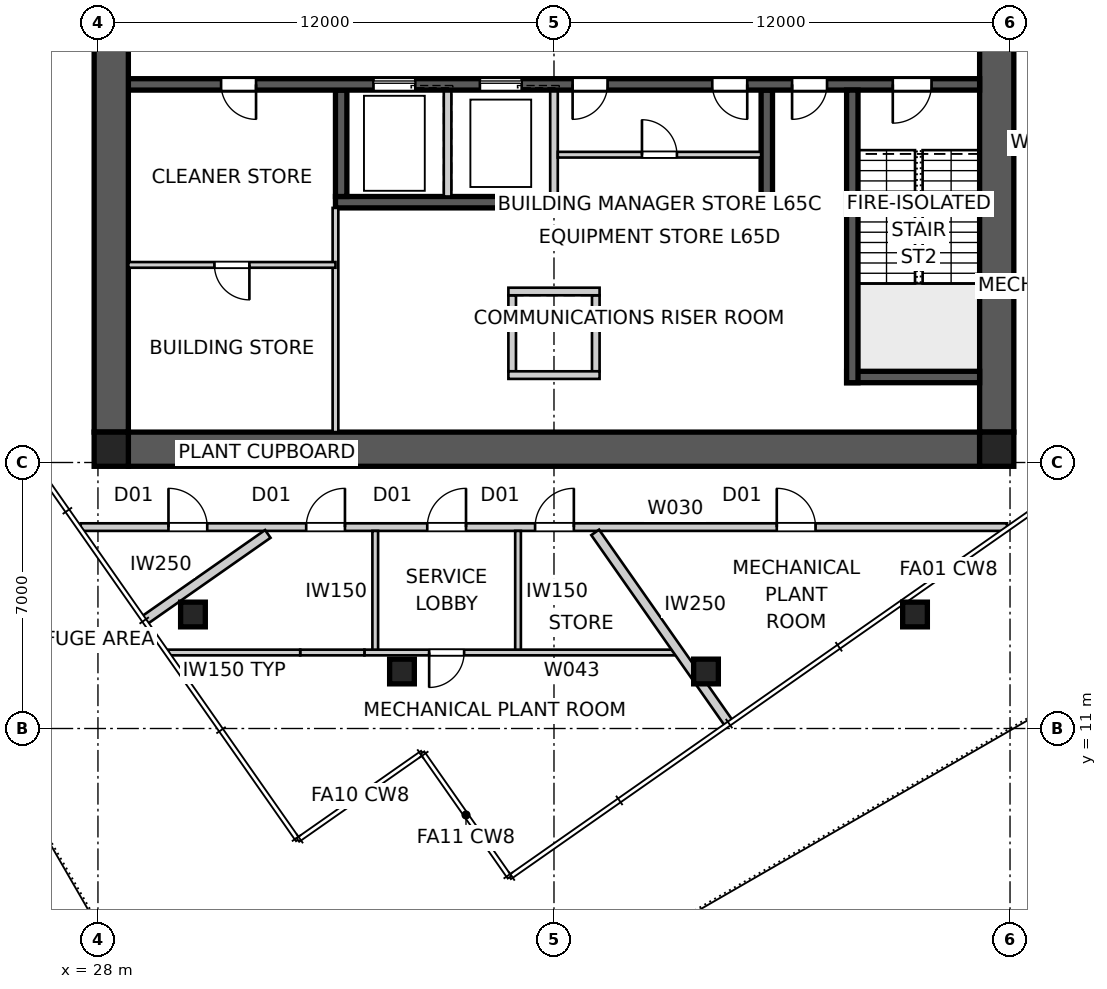
"""IFC4 building model, lengths in metres.
Left out: names, types, materials, properties, quantities, classifications, styles, units other than length and angle.
Written with IfcOpenShell. Run it as: python <this file> out.ifc"""

import sys

from ifc_helpers import new_model, si_unit, direction, frame, frame_2d, origin, origin_2d, place, context, subcontext, project, spatial, polyline, rectangle, outline, extrude, element, fill, save


model = new_model("IFC4")
c1 = context("Model", 3, precision=1e-05, world=origin(), true_north=direction((0.0, 1.0)))
c2 = subcontext(c1, "Body", "Model", "MODEL_VIEW")
j1 = project(units=[si_unit("LENGTHUNIT", "METRE"), si_unit("PLANEANGLEUNIT", "RADIAN")], contexts=[c1])
p1 = place(None, origin())
s1 = spatial("IfcSite", under=j1, at=p1, CompositionType="ELEMENT")
p2 = place(p1, origin())
s2 = spatial("IfcBuilding", under=s1, at=p2, CompositionType="ELEMENT")
p3 = place(p2, frame((0.0, 0.0, 235.4)))
s3 = spatial("IfcBuildingStorey", under=s2, at=p3, CompositionType="ELEMENT", Elevation=235.4)
p4 = place(p3, frame((51.2, 18.35, 0.0), z_axis=(0.0, 0.0, 1.0), x_axis=(-1.0, 0.0, 0.0)))
e1 = element("IfcWall", 1, at=p4, inside=s3, PredefinedType="SHEAR", context=c2, shape_type="SweptSolid", body=[
    extrude(outline(polyline([(0.0, -0.45), (22.4, -0.45), (22.4, -0.025), (22.85, -0.025), (22.85, 0.025), (22.4, 0.025), (22.4, 0.45), (0.0, 0.45), (0.0, 0.025), (-0.45, 0.025), (-0.45, -0.025), (0.0, -0.025), (0.0, -0.45)])), origin(), (0.0, 0.0, 1.0), 5.0),
])
p5 = place(p3, frame((51.65, 18.8, 0.0), z_axis=(0.0, 0.0, 1.0), x_axis=(0.0, 1.0, 0.0)))
e2 = element("IfcWall", 2, at=p5, inside=s3, PredefinedType="SHEAR", context=c2, shape_type="SweptSolid", body=[
    extrude(outline(polyline([(0.0, -0.45), (22.4, -0.45), (22.4, -0.025), (22.85, -0.025), (22.85, 0.025), (22.4, 0.025), (22.4, 0.45), (0.0, 0.45), (0.0, 0.025), (-0.45, 0.025), (-0.45, -0.025), (0.0, -0.025), (0.0, -0.45)])), origin(), (0.0, 0.0, 1.0), 5.0),
])
p6 = place(p5, frame((11.14, 0.0, 0.0)))
e3 = element("IfcOpeningElement", 3, at=p6, cuts=e2, PredefinedType="OPENING", context=c2, shape_type="SweptSolid", body=[
    extrude(rectangle(XDim=1.02, YDim=2.4, at=frame_2d((0.51, 1.2))), frame((0.0, 0.46, 0.0), z_axis=(0.0, -1.0, 0.0), x_axis=(1.0, 0.0, 0.0)), (0.0, 0.0, 1.0), 0.92),
])
p7 = place(p3, frame((28.35, 41.2, 0.0), z_axis=(0.0, 0.0, 1.0), x_axis=(0.0, -1.0, 0.0)))
e4 = element("IfcWall", 4, at=p7, inside=s3, PredefinedType="SHEAR", context=c2, shape_type="SweptSolid", body=[
    extrude(outline(polyline([(0.0, -0.45), (22.4, -0.45), (22.4, -0.025), (22.85, -0.025), (22.85, 0.025), (22.4, 0.025), (22.4, 0.45), (0.0, 0.45), (0.0, 0.025), (-0.45, 0.025), (-0.45, -0.025), (0.0, -0.025), (0.0, -0.45)])), origin(), (0.0, 0.0, 1.0), 5.0),
])
p8 = place(p7, frame((11.14, 0.0, 0.0)))
e5 = element("IfcOpeningElement", 5, at=p8, cuts=e4, PredefinedType="OPENING", context=c2, shape_type="SweptSolid", body=[
    extrude(rectangle(XDim=1.02, YDim=2.4, at=frame_2d((0.51, 1.2))), frame((0.0, 0.46, 0.0), z_axis=(0.0, -1.0, 0.0), x_axis=(1.0, 0.0, 0.0)), (0.0, 0.0, 1.0), 0.92),
])
p9 = place(p3, frame((51.2, 27.95, 0.0), z_axis=(0.0, 0.0, 1.0), x_axis=(-1.0, 0.0, 0.0)))
e6 = element("IfcWall", 6, at=p9, inside=s3, PredefinedType="SHEAR", context=c2, shape_type="SweptSolid", body=[
    extrude(rectangle(XDim=22.4, YDim=0.3, at=frame_2d((11.2, 0.0))), origin(), (0.0, 0.0, 1.0), 5.0),
])
p10 = place(p9, frame((19.04, 0.0, 0.0)))
e7 = element("IfcOpeningElement", 7, at=p10, cuts=e6, PredefinedType="OPENING", context=c2, shape_type="SweptSolid", body=[
    extrude(rectangle(XDim=0.92, YDim=2.1, at=frame_2d((0.46, 1.05))), frame((0.0, 0.16, 0.0), z_axis=(0.0, -1.0, 0.0), x_axis=(1.0, 0.0, 0.0)), (0.0, 0.0, 1.0), 0.32),
])
p11 = place(p9, frame((1.265, 0.0, 0.0)))
e8 = element("IfcOpeningElement", 8, at=p11, cuts=e6, PredefinedType="OPENING", context=c2, shape_type="SweptSolid", body=[
    extrude(rectangle(XDim=1.02, YDim=2.1, at=frame_2d((0.51, 1.05))), frame((0.0, 0.16, 0.0), z_axis=(0.0, -1.0, 0.0), x_axis=(1.0, 0.0, 0.0)), (0.0, 0.0, 1.0), 0.32),
])
p12 = place(p9, frame((4.015, 0.0, 0.0)))
e9 = element("IfcOpeningElement", 9, at=p12, cuts=e6, PredefinedType="OPENING", context=c2, shape_type="SweptSolid", body=[
    extrude(rectangle(XDim=0.92, YDim=2.1, at=frame_2d((0.46, 1.05))), frame((0.0, 0.16, 0.0), z_axis=(0.0, -1.0, 0.0), x_axis=(1.0, 0.0, 0.0)), (0.0, 0.0, 1.0), 0.32),
])
p13 = place(p9, frame((9.79, 0.0, 0.0)))
e10 = element("IfcOpeningElement", 10, at=p13, cuts=e6, PredefinedType="OPENING", context=c2, shape_type="SweptSolid", body=[
    extrude(rectangle(XDim=0.92, YDim=2.1, at=frame_2d((0.46, 1.05))), frame((0.0, 0.16, 0.0), z_axis=(0.0, -1.0, 0.0), x_axis=(1.0, 0.0, 0.0)), (0.0, 0.0, 1.0), 0.32),
])
p14 = place(p9, frame((6.115, 0.0, 0.0)))
e11 = element("IfcOpeningElement", 11, at=p14, cuts=e6, PredefinedType="OPENING", context=c2, shape_type="SweptSolid", body=[
    extrude(rectangle(XDim=0.92, YDim=2.1, at=frame_2d((0.46, 1.05))), frame((0.0, 0.16, 0.0), z_axis=(0.0, -1.0, 0.0), x_axis=(1.0, 0.0, 0.0)), (0.0, 0.0, 1.0), 0.32),
])
p15 = place(p9, frame((12.05, 0.0, 0.0)))
e12 = element("IfcOpeningElement", 12, at=p15, cuts=e6, PredefinedType="OPENING", context=c2, shape_type="SweptSolid", body=[
    extrude(rectangle(XDim=1.1, YDim=2.1, at=frame_2d((0.55, 1.05))), frame((0.0, 0.16, 0.0), z_axis=(0.0, -1.0, 0.0), x_axis=(1.0, 0.0, 0.0)), (0.0, 0.0, 1.0), 0.32),
])
p16 = place(p9, frame((14.85, 0.0, 0.0)))
e13 = element("IfcOpeningElement", 13, at=p16, cuts=e6, PredefinedType="OPENING", context=c2, shape_type="SweptSolid", body=[
    extrude(rectangle(XDim=1.1, YDim=2.1, at=frame_2d((0.55, 1.05))), frame((0.0, 0.16, 0.0), z_axis=(0.0, -1.0, 0.0), x_axis=(1.0, 0.0, 0.0)), (0.0, 0.0, 1.0), 0.32),
])
p17 = place(p3, frame((45.75, 24.85, 0.0), z_axis=(0.0, 0.0, 1.0), x_axis=(-1.0, 0.0, 0.0)))
e14 = element("IfcWall", 14, at=p17, inside=s3, PredefinedType="SHEAR", context=c2, shape_type="SweptSolid", body=[
    extrude(rectangle(XDim=11.5, YDim=0.3, at=frame_2d((5.75, 0.0))), origin(), (0.0, 0.0, 1.0), 5.0),
])
p18 = place(p3, frame((45.6, 27.8, 0.0), z_axis=(0.0, 0.0, 1.0), x_axis=(0.0, -1.0, 0.0)))
e15 = element("IfcWall", 15, at=p18, inside=s3, PredefinedType="SHEAR", context=c2, shape_type="SweptSolid", body=[
    extrude(rectangle(XDim=2.8, YDim=0.3, at=frame_2d((1.4, 0.0))), origin(), (0.0, 0.0, 1.0), 5.0),
])
for number, where, z_axis, x_axis in (
    (16, (40.0, 27.8, 0.0), (0.0, 0.0, 1.0), (0.0, -1.0, 0.0)),
    (17, (37.2, 27.8, 0.0), (0.0, 0.0, 1.0), (0.0, -1.0, 0.0)),
):
    element("IfcWall", number, at=place(p3, frame(where, z_axis=z_axis, x_axis=x_axis)), inside=s3, PredefinedType="SOLIDWALL", context=c2, shape_type="SweptSolid", body=[
        extrude(rectangle(XDim=2.8, YDim=0.2, at=frame_2d((1.4, 0.0))), origin(), (0.0, 0.0, 1.0), 5.0),
    ])
p19 = place(p3, frame((34.4, 27.8, 0.0), z_axis=(0.0, 0.0, 1.0), x_axis=(0.0, -1.0, 0.0)))
e18 = element("IfcWall", 18, at=p19, inside=s3, PredefinedType="SHEAR", context=c2, shape_type="SweptSolid", body=[
    extrude(rectangle(XDim=2.8, YDim=0.3, at=frame_2d((1.4, 0.0))), origin(), (0.0, 0.0, 1.0), 5.0),
])
p20 = place(p3, frame((47.85, 27.8, 0.0), z_axis=(0.0, 0.0, 1.0), x_axis=(0.0, -1.0, 0.0)))
e19 = element("IfcWall", 19, at=p20, inside=s3, PredefinedType="SHEAR", context=c2, shape_type="SweptSolid", body=[
    extrude(rectangle(XDim=7.7, YDim=0.3, at=frame_2d((3.85, 0.0))), origin(), (0.0, 0.0, 1.0), 5.0),
])
p21 = place(p3, frame((51.2, 20.25, 0.0), z_axis=(0.0, 0.0, 1.0), x_axis=(-1.0, 0.0, 0.0)))
e20 = element("IfcWall", 20, at=p21, inside=s3, PredefinedType="SHEAR", context=c2, shape_type="SweptSolid", body=[
    extrude(rectangle(XDim=3.5, YDim=0.3, at=frame_2d((1.75, 0.0))), origin(), (0.0, 0.0, 1.0), 5.0),
])
for number, where, z_axis, x_axis in (
    (21, (38.9, 22.4, 0.0), (0.0, 0.0, 1.0), (0.0, -1.0, 0.0)),
    (22, (41.1, 22.4, 0.0), (0.0, 0.0, 1.0), (0.0, -1.0, 0.0)),
):
    element("IfcWall", number, at=place(p3, frame(where, z_axis=z_axis, x_axis=x_axis)), inside=s3, PredefinedType="SOLIDWALL", context=c2, shape_type="SweptSolid", body=[
        extrude(rectangle(XDim=2.0, YDim=0.2, at=frame_2d((1.0, 0.0))), origin(), (0.0, 0.0, 1.0), 5.0),
    ])
for number, where, z_axis, x_axis in (
    (23, (38.8, 22.5, 0.0), (0.0, 0.0, 1.0), (1.0, 0.0, 0.0)),
    (24, (38.8, 20.3, 0.0), (0.0, 0.0, 1.0), (1.0, 0.0, 0.0)),
):
    element("IfcWall", number, at=place(p3, frame(where, z_axis=z_axis, x_axis=x_axis)), inside=s3, PredefinedType="SOLIDWALL", context=c2, shape_type="SweptSolid", body=[
        extrude(rectangle(XDim=2.4, YDim=0.2, at=frame_2d((1.2, 0.0))), origin(), (0.0, 0.0, 1.0), 5.0),
    ])
for number, where, z_axis, x_axis in (
    (25, (28.35, 18.35, 0.0), (0.0, 0.0, 1.0), (1.0, 0.0, 0.0)),
    (26, (51.65, 18.35, 0.0), (0.0, 0.0, 1.0), (1.0, 0.0, 0.0)),
):
    element("IfcColumn", number, at=place(p3, frame(where, z_axis=z_axis, x_axis=x_axis)), inside=s3, PredefinedType="COLUMN", context=c2, shape_type="SweptSolid", body=[
        extrude(rectangle(XDim=0.9, YDim=0.9, at=origin_2d()), origin(), (0.0, 0.0, 1.0), 5.0),
    ])
for number, where, z_axis, x_axis in (
    (27, (30.5, 14.0, 0.0), (0.0, 0.0, 1.0), (1.0, 0.0, 0.0)),
    (28, (36.0, 12.5, 0.0), (0.0, 0.0, 1.0), (1.0, 0.0, 0.0)),
    (29, (44.0, 12.5, 0.0), (0.0, 0.0, 1.0), (1.0, 0.0, 0.0)),
    (30, (49.5, 14.0, 0.0), (0.0, 0.0, 1.0), (1.0, 0.0, 0.0)),
):
    element("IfcColumn", number, at=place(p3, frame(where, z_axis=z_axis, x_axis=x_axis)), inside=s3, PredefinedType="COLUMN", context=c2, shape_type="SweptSolid", body=[
        extrude(rectangle(XDim=0.65, YDim=0.65, at=origin_2d()), origin(), (0.0, 0.0, 1.0), 5.0),
    ])
p22 = place(p3, frame((27.546, 16.3, 0.0), z_axis=(0.0, 0.0, 1.0), x_axis=(1.0, 0.0, 0.0)))
e31 = element("IfcWall", 31, at=p22, inside=s3, PredefinedType="PARTITIONING", context=c2, shape_type="SweptSolid", body=[
    extrude(rectangle(XDim=24.375, YDim=0.2, at=frame_2d((12.188, 0.0))), origin(), (0.0, 0.0, 1.0), 4.85),
])
p23 = place(p22, frame((18.317, 0.0, 0.0)))
e32 = element("IfcOpeningElement", 32, at=p23, cuts=e31, PredefinedType="OPENING", context=c2, shape_type="SweptSolid", body=[
    extrude(rectangle(XDim=1.02, YDim=2.34, at=frame_2d((0.51, 1.17))), frame((0.0, 0.11, 0.0), z_axis=(0.0, -1.0, 0.0), x_axis=(1.0, 0.0, 0.0)), (0.0, 0.0, 1.0), 0.22),
])
p24 = place(p22, frame((2.31, 0.0, 0.0)))
e33 = element("IfcOpeningElement", 33, at=p24, cuts=e31, PredefinedType="OPENING", context=c2, shape_type="SweptSolid", body=[
    extrude(rectangle(XDim=1.02, YDim=2.34, at=frame_2d((0.51, 1.17))), frame((0.0, 0.11, 0.0), z_axis=(0.0, -1.0, 0.0), x_axis=(1.0, 0.0, 0.0)), (0.0, 0.0, 1.0), 0.22),
])
p25 = place(p22, frame((9.119, 0.0, 0.0)))
e34 = element("IfcOpeningElement", 34, at=p25, cuts=e31, PredefinedType="OPENING", context=c2, shape_type="SweptSolid", body=[
    extrude(rectangle(XDim=1.02, YDim=2.34, at=frame_2d((0.51, 1.17))), frame((0.0, 0.11, 0.0), z_axis=(0.0, -1.0, 0.0), x_axis=(1.0, 0.0, 0.0)), (0.0, 0.0, 1.0), 0.22),
])
p26 = place(p22, frame((5.934, 0.0, 0.0)))
e35 = element("IfcOpeningElement", 35, at=p26, cuts=e31, PredefinedType="OPENING", context=c2, shape_type="SweptSolid", body=[
    extrude(rectangle(XDim=1.02, YDim=2.34, at=frame_2d((0.51, 1.17))), frame((0.0, 0.11, 0.0), z_axis=(0.0, -1.0, 0.0), x_axis=(1.0, 0.0, 0.0)), (0.0, 0.0, 1.0), 0.22),
])
p27 = place(p22, frame((11.957, 0.0, 0.0)))
e36 = element("IfcOpeningElement", 36, at=p27, cuts=e31, PredefinedType="OPENING", context=c2, shape_type="SweptSolid", body=[
    extrude(rectangle(XDim=1.02, YDim=2.34, at=frame_2d((0.51, 1.17))), frame((0.0, 0.11, 0.0), z_axis=(0.0, -1.0, 0.0), x_axis=(1.0, 0.0, 0.0)), (0.0, 0.0, 1.0), 0.22),
])
p28 = place(p3, frame((44.607, 11.13, 0.0), z_axis=(0.0, 0.0, 1.0), x_axis=(-0.573561042841, 0.819162822725, 0.0)))
e37 = element("IfcWall", 37, at=p28, inside=s3, PredefinedType="PARTITIONING", context=c2, shape_type="SweptSolid", body=[
    extrude(rectangle(XDim=6.142, YDim=0.25, at=frame_2d((3.071, 0.0))), origin(), (0.0, 0.0, 1.0), 4.85),
])
p29 = place(p3, frame((29.217, 13.843, 0.0), z_axis=(0.0, 0.0, 1.0), x_axis=(0.819156806092, 0.573569635732, 0.0)))
e38 = element("IfcWall", 38, at=p29, inside=s3, PredefinedType="PARTITIONING", context=c2, shape_type="SweptSolid", body=[
    extrude(rectangle(XDim=3.97, YDim=0.25, at=frame_2d((1.985, 0.0))), origin(), (0.0, 0.0, 1.0), 4.85),
])
p30 = place(p3, frame((34.25, 18.8, 0.0), z_axis=(0.0, 0.0, 1.0), x_axis=(0.0, 1.0, 0.0)))
e39 = element("IfcWall", 39, at=p30, inside=s3, PredefinedType="SOLIDWALL", context=c2, shape_type="SweptSolid", body=[
    extrude(rectangle(XDim=5.9, YDim=0.15, at=frame_2d((2.95, 0.0))), origin(), (0.0, 0.0, 1.0), 4.85),
])
p31 = place(p3, frame((34.25, 23.2, 0.0), z_axis=(0.0, 0.0, 1.0), x_axis=(-1.0, 0.0, 0.0)))
e40 = element("IfcWall", 40, at=p31, inside=s3, PredefinedType="SOLIDWALL", context=c2, shape_type="SweptSolid", body=[
    extrude(rectangle(XDim=5.45, YDim=0.15, at=frame_2d((2.725, 0.0))), origin(), (0.0, 0.0, 1.0), 4.85),
])
p32 = place(p31, frame((2.265, 0.0, 0.0)))
e41 = element("IfcOpeningElement", 41, at=p32, cuts=e40, PredefinedType="OPENING", context=c2, shape_type="SweptSolid", body=[
    extrude(rectangle(XDim=0.92, YDim=2.1, at=frame_2d((0.46, 1.05))), frame((0.0, 0.085, 0.0), z_axis=(0.0, -1.0, 0.0), x_axis=(1.0, 0.0, 0.0)), (0.0, 0.0, 1.0), 0.17),
])
for number, where, z_axis, x_axis in (
    (42, (35.296, 13.0, 0.0), (0.0, 0.0, 1.0), (0.0, 1.0, 0.0)),
    (43, (39.054, 16.2, 0.0), (0.0, 0.0, 1.0), (0.0, -1.0, 0.0)),
):
    element("IfcWall", number, at=place(p3, frame(where, z_axis=z_axis, x_axis=x_axis)), inside=s3, PredefinedType="SOLIDWALL", context=c2, shape_type="SweptSolid", body=[
        extrude(rectangle(XDim=3.2, YDim=0.15, at=frame_2d((1.6, 0.0))), origin(), (0.0, 0.0, 1.0), 4.85),
    ])
p33 = place(p3, frame((43.297, 13.0, 0.0), z_axis=(0.0, 0.0, 1.0), x_axis=(-1.0, 0.0, 0.0)))
e44 = element("IfcWall", 44, at=p33, inside=s3, PredefinedType="SOLIDWALL", context=c2, shape_type="SweptSolid", body=[
    extrude(rectangle(XDim=8.285, YDim=0.15, at=frame_2d((4.143, 0.0))), origin(), (0.0, 0.0, 1.0), 4.85),
])
p34 = place(p33, frame((5.662, 0.0, 0.0)))
e45 = element("IfcOpeningElement", 45, at=p34, cuts=e44, PredefinedType="OPENING", context=c2, shape_type="SweptSolid", body=[
    extrude(rectangle(XDim=0.92, YDim=2.1, at=frame_2d((0.46, 1.05))), frame((0.0, 0.085, 0.0), z_axis=(0.0, -1.0, 0.0), x_axis=(1.0, 0.0, 0.0)), (0.0, 0.0, 1.0), 0.17),
])
p35 = place(p3, frame((35.012, 13.0, 0.0), z_axis=(0.0, 0.0, 1.0), x_axis=(-1.0, 0.0, 0.0)))
e46 = element("IfcWall", 46, at=p35, inside=s3, PredefinedType="SOLIDWALL", context=c2, shape_type="SweptSolid", body=[
    extrude(rectangle(XDim=1.69, YDim=0.15, at=frame_2d((0.845, 0.0))), origin(), (0.0, 0.0, 1.0), 3.85),
])
p36 = place(p3, frame((33.322, 13.0, 0.0), z_axis=(0.0, 0.0, 1.0), x_axis=(-1.0, 0.0, 0.0)))
e47 = element("IfcWall", 47, at=p36, inside=s3, PredefinedType="SOLIDWALL", context=c2, shape_type="SweptSolid", body=[
    extrude(rectangle(XDim=3.465, YDim=0.15, at=frame_2d((1.732, 0.0))), origin(), (0.0, 0.0, 1.0), 4.85),
])
p37 = place(p3, frame((40.1, 26.1, 0.0), z_axis=(0.0, 0.0, 1.0), x_axis=(1.0, 0.0, 0.0)))
e48 = element("IfcWall", 48, at=p37, inside=s3, PredefinedType="SOLIDWALL", context=c2, shape_type="SweptSolid", body=[
    extrude(rectangle(XDim=5.35, YDim=0.15, at=frame_2d((2.675, 0.0))), origin(), (0.0, 0.0, 1.0), 4.85),
])
p38 = place(p37, frame((2.215, 0.0, 0.0)))
e49 = element("IfcOpeningElement", 49, at=p38, cuts=e48, PredefinedType="OPENING", context=c2, shape_type="SweptSolid", body=[
    extrude(rectangle(XDim=0.92, YDim=2.1, at=frame_2d((0.46, 1.05))), frame((0.0, 0.085, 0.0), z_axis=(0.0, -1.0, 0.0), x_axis=(1.0, 0.0, 0.0)), (0.0, 0.0, 1.0), 0.17),
])
p39 = place(p10, origin())
e50 = element("IfcDoor", 50, at=p39, inside=s3, OperationType="SINGLE_SWING_LEFT", PredefinedType="DOOR", context=c2, shape_type="SweptSolid", body=[
    extrude(rectangle(XDim=0.92, YDim=2.1, at=frame_2d((0.46, 1.05))), frame((0.0, 0.025, 0.0), z_axis=(0.0, -1.0, 0.0), x_axis=(1.0, 0.0, 0.0)), (0.0, 0.0, 1.0), 0.05),
])
fill(e7, e50)
p40 = place(p11, origin())
e51 = element("IfcDoor", 51, at=p40, inside=s3, OperationType="SINGLE_SWING_RIGHT", PredefinedType="DOOR", context=c2, shape_type="SweptSolid", body=[
    extrude(rectangle(XDim=1.02, YDim=2.1, at=frame_2d((0.51, 1.05))), frame((0.0, 0.025, 0.0), z_axis=(0.0, -1.0, 0.0), x_axis=(1.0, 0.0, 0.0)), (0.0, 0.0, 1.0), 0.05),
])
fill(e8, e51)
p41 = place(p12, origin())
e52 = element("IfcDoor", 52, at=p41, inside=s3, OperationType="SINGLE_SWING_RIGHT", PredefinedType="DOOR", context=c2, shape_type="SweptSolid", body=[
    extrude(rectangle(XDim=0.92, YDim=2.1, at=frame_2d((0.46, 1.05))), frame((0.0, 0.025, 0.0), z_axis=(0.0, -1.0, 0.0), x_axis=(1.0, 0.0, 0.0)), (0.0, 0.0, 1.0), 0.05),
])
fill(e9, e52)
p42 = place(p23, origin())
e53 = element("IfcDoor", 53, at=p42, inside=s3, OperationType="SINGLE_SWING_LEFT", PredefinedType="DOOR", context=c2, shape_type="SweptSolid", body=[
    extrude(rectangle(XDim=1.02, YDim=2.34, at=frame_2d((0.51, 1.17))), frame((0.0, 0.025, 0.0), z_axis=(0.0, -1.0, 0.0), x_axis=(1.0, 0.0, 0.0)), (0.0, 0.0, 1.0), 0.05),
])
fill(e32, e53)
p43 = place(p24, origin())
e54 = element("IfcDoor", 54, at=p43, inside=s3, OperationType="SINGLE_SWING_LEFT", PredefinedType="DOOR", context=c2, shape_type="SweptSolid", body=[
    extrude(rectangle(XDim=1.02, YDim=2.34, at=frame_2d((0.51, 1.17))), frame((0.0, 0.025, 0.0), z_axis=(0.0, -1.0, 0.0), x_axis=(1.0, 0.0, 0.0)), (0.0, 0.0, 1.0), 0.05),
])
fill(e33, e54)
p44 = place(p25, origin())
e55 = element("IfcDoor", 55, at=p44, inside=s3, OperationType="SINGLE_SWING_RIGHT", PredefinedType="DOOR", context=c2, shape_type="SweptSolid", body=[
    extrude(rectangle(XDim=1.02, YDim=2.34, at=frame_2d((0.51, 1.17))), frame((0.0, 0.025, 0.0), z_axis=(0.0, -1.0, 0.0), x_axis=(1.0, 0.0, 0.0)), (0.0, 0.0, 1.0), 0.05),
])
fill(e34, e55)
p45 = place(p26, origin())
e56 = element("IfcDoor", 56, at=p45, inside=s3, OperationType="SINGLE_SWING_RIGHT", PredefinedType="DOOR", context=c2, shape_type="SweptSolid", body=[
    extrude(rectangle(XDim=1.02, YDim=2.34, at=frame_2d((0.51, 1.17))), frame((0.0, 0.025, 0.0), z_axis=(0.0, -1.0, 0.0), x_axis=(1.0, 0.0, 0.0)), (0.0, 0.0, 1.0), 0.05),
])
fill(e35, e56)
p46 = place(p27, origin())
e57 = element("IfcDoor", 57, at=p46, inside=s3, OperationType="SINGLE_SWING_RIGHT", PredefinedType="DOOR", context=c2, shape_type="SweptSolid", body=[
    extrude(rectangle(XDim=1.02, YDim=2.34, at=frame_2d((0.51, 1.17))), frame((0.0, 0.025, 0.0), z_axis=(0.0, -1.0, 0.0), x_axis=(1.0, 0.0, 0.0)), (0.0, 0.0, 1.0), 0.05),
])
fill(e36, e57)
p47 = place(p32, origin())
e58 = element("IfcDoor", 58, at=p47, inside=s3, OperationType="SINGLE_SWING_LEFT", PredefinedType="DOOR", context=c2, shape_type="SweptSolid", body=[
    extrude(rectangle(XDim=0.92, YDim=2.1, at=frame_2d((0.46, 1.05))), frame((0.0, 0.025, 0.0), z_axis=(0.0, -1.0, 0.0), x_axis=(1.0, 0.0, 0.0)), (0.0, 0.0, 1.0), 0.05),
])
fill(e41, e58)
p48 = place(p34, origin())
e59 = element("IfcDoor", 59, at=p48, inside=s3, OperationType="SINGLE_SWING_RIGHT", PredefinedType="DOOR", context=c2, shape_type="SweptSolid", body=[
    extrude(rectangle(XDim=0.92, YDim=2.1, at=frame_2d((0.46, 1.05))), frame((0.0, 0.025, 0.0), z_axis=(0.0, -1.0, 0.0), x_axis=(1.0, 0.0, 0.0)), (0.0, 0.0, 1.0), 0.05),
])
fill(e45, e59)
p49 = place(p13, origin())
e60 = element("IfcDoor", 60, at=p49, inside=s3, OperationType="SINGLE_SWING_RIGHT", PredefinedType="DOOR", context=c2, shape_type="SweptSolid", body=[
    extrude(rectangle(XDim=0.92, YDim=2.1, at=frame_2d((0.46, 1.05))), frame((0.0, 0.025, 0.0), z_axis=(0.0, -1.0, 0.0), x_axis=(1.0, 0.0, 0.0)), (0.0, 0.0, 1.0), 0.05),
])
fill(e10, e60)
p50 = place(p14, origin())
e61 = element("IfcDoor", 61, at=p50, inside=s3, OperationType="SINGLE_SWING_LEFT", PredefinedType="DOOR", context=c2, shape_type="SweptSolid", body=[
    extrude(rectangle(XDim=0.92, YDim=2.1, at=frame_2d((0.46, 1.05))), frame((0.0, 0.025, 0.0), z_axis=(0.0, -1.0, 0.0), x_axis=(1.0, 0.0, 0.0)), (0.0, 0.0, 1.0), 0.05),
])
fill(e11, e61)
p51 = place(p38, origin())
e62 = element("IfcDoor", 62, at=p51, inside=s3, OperationType="SINGLE_SWING_LEFT", PredefinedType="DOOR", context=c2, shape_type="SweptSolid", body=[
    extrude(rectangle(XDim=0.92, YDim=2.1, at=frame_2d((0.46, 1.05))), frame((0.0, 0.025, 0.0), z_axis=(0.0, -1.0, 0.0), x_axis=(1.0, 0.0, 0.0)), (0.0, 0.0, 1.0), 0.05),
])
fill(e49, e62)
p52 = place(p15, origin())
e63 = element("IfcDoor", 63, at=p52, inside=s3, OperationType="SLIDING_TO_LEFT", PredefinedType="DOOR", context=c2, shape_type="SweptSolid", body=[
    extrude(rectangle(XDim=1.1, YDim=2.1, at=frame_2d((0.55, 1.05))), frame((0.0, 0.025, 0.0), z_axis=(0.0, -1.0, 0.0), x_axis=(1.0, 0.0, 0.0)), (0.0, 0.0, 1.0), 0.05),
])
fill(e12, e63)
p53 = place(p16, origin())
e64 = element("IfcDoor", 64, at=p53, inside=s3, OperationType="SLIDING_TO_LEFT", PredefinedType="DOOR", context=c2, shape_type="SweptSolid", body=[
    extrude(rectangle(XDim=1.1, YDim=2.1, at=frame_2d((0.55, 1.05))), frame((0.0, 0.025, 0.0), z_axis=(0.0, -1.0, 0.0), x_axis=(1.0, 0.0, 0.0)), (0.0, 0.0, 1.0), 0.05),
])
fill(e13, e64)
save(model, sys.argv[1])
